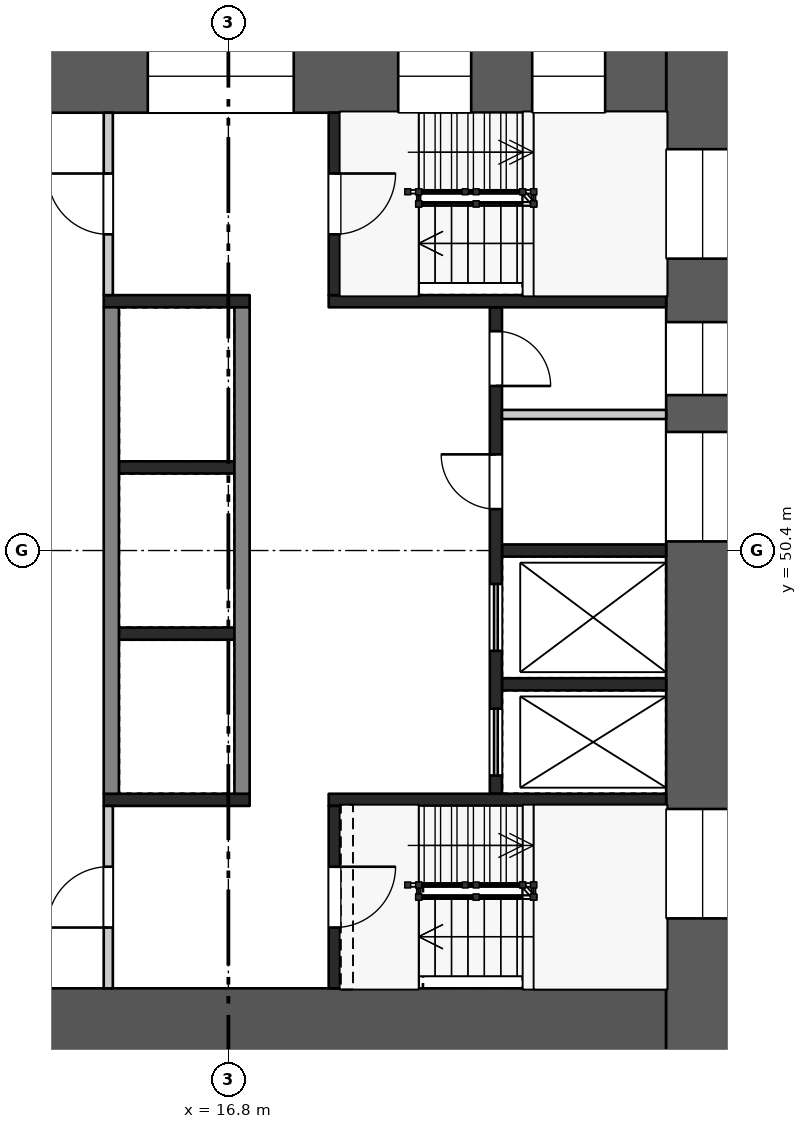
"""IFC4 building model, lengths in metres.
Left out: names, types, materials, properties, quantities, classifications, styles, units other than length and angle.
Written with IfcOpenShell. Run it as: python <this file> out.ifc"""

import sys

from ifc_helpers import new_model, si_unit, direction, frame, frame_2d, origin, place, context, subcontext, project, spatial, rectangle, extrude, element, fill, save


model = new_model("IFC4")
c1 = context("Model", 3, precision=1e-05, world=origin(), true_north=direction((0.0, 1.0)))
c2 = subcontext(c1, "Body", "Model", "MODEL_VIEW")
j1 = project(units=[si_unit("LENGTHUNIT", "METRE"), si_unit("PLANEANGLEUNIT", "RADIAN")], contexts=[c1])
p1 = place(None, origin())
s1 = spatial("IfcSite", under=j1, at=p1, CompositionType="ELEMENT")
p2 = place(p1, origin())
s2 = spatial("IfcBuilding", under=s1, at=p2, CompositionType="ELEMENT")
p3 = place(p2, frame((0.0, 0.0, 9.0)))
s3 = spatial("IfcBuildingStorey", under=s2, at=p3, CompositionType="ELEMENT", Elevation=9.0)
p4 = place(p3, frame((24.6, 58.8, 0.0), z_axis=(0.0, 0.0, 1.0), x_axis=(0.0, -1.0, 0.0)))
e1 = element("IfcWall", 1, at=p4, inside=s3, PredefinedType="SHEAR", context=c2, shape_type="SweptSolid", body=[
    extrude(rectangle(XDim=16.8, YDim=1.2, at=frame_2d((8.4, 0.0))), origin(), (0.0, 0.0, 1.0), 4.98),
])
p5 = place(p4, frame((1.8, 0.0, 0.5)))
e2 = element("IfcOpeningElement", 2, at=p5, cuts=e1, PredefinedType="OPENING", context=c2, shape_type="SweptSolid", body=[
    extrude(rectangle(XDim=1.8, YDim=2.4, at=frame_2d((0.9, 1.2))), frame((0.0, 0.61, 0.0), z_axis=(0.0, -1.0, 0.0), x_axis=(1.0, 0.0, 0.0)), (0.0, 0.0, 1.0), 1.22),
])
p6 = place(p4, frame((4.644, 0.0, 1.6)))
e3 = element("IfcOpeningElement", 3, at=p6, cuts=e1, PredefinedType="OPENING", context=c2, shape_type="SweptSolid", body=[
    extrude(rectangle(XDim=1.2, YDim=1.2, at=frame_2d((0.6, 0.6))), frame((0.0, 0.61, 0.0), z_axis=(0.0, -1.0, 0.0), x_axis=(1.0, 0.0, 0.0)), (0.0, 0.0, 1.0), 1.22),
])
p7 = place(p4, frame((6.45, 0.0, 1.6)))
e4 = element("IfcOpeningElement", 4, at=p7, cuts=e1, PredefinedType="OPENING", context=c2, shape_type="SweptSolid", body=[
    extrude(rectangle(XDim=1.8, YDim=1.2, at=frame_2d((0.9, 0.6))), frame((0.0, 0.61, 0.0), z_axis=(0.0, -1.0, 0.0), x_axis=(1.0, 0.0, 0.0)), (0.0, 0.0, 1.0), 1.22),
])
p8 = place(p4, frame((12.65, 0.0, 0.5)))
e5 = element("IfcOpeningElement", 5, at=p8, cuts=e1, PredefinedType="OPENING", context=c2, shape_type="SweptSolid", body=[
    extrude(rectangle(XDim=1.8, YDim=2.4, at=frame_2d((0.9, 1.2))), frame((0.0, 0.61, 0.0), z_axis=(0.0, -1.0, 0.0), x_axis=(1.0, 0.0, 0.0)), (0.0, 0.0, 1.0), 1.22),
])
p9 = place(p3, frame((9.6, 58.2, 0.0), z_axis=(0.0, 0.0, 1.0), x_axis=(1.0, 0.0, 0.0)))
e6 = element("IfcWall", 6, at=p9, inside=s3, PredefinedType="SHEAR", context=c2, shape_type="SweptSolid", body=[
    extrude(rectangle(XDim=14.4, YDim=1.2, at=frame_2d((7.2, 0.0))), origin(), (0.0, 0.0, 1.0), 4.98),
])
p10 = place(p9, frame((1.105, 0.0, 0.6)))
e7 = element("IfcOpeningElement", 7, at=p10, cuts=e6, PredefinedType="OPENING", context=c2, shape_type="SweptSolid", body=[
    extrude(rectangle(XDim=3.0, YDim=2.1, at=frame_2d((1.5, 1.05))), frame((0.0, 0.61, 0.0), z_axis=(0.0, -1.0, 0.0), x_axis=(1.0, 0.0, 0.0)), (0.0, 0.0, 1.0), 1.22),
])
p11 = place(p9, frame((5.875, 0.0, 0.6)))
e8 = element("IfcOpeningElement", 8, at=p11, cuts=e6, PredefinedType="OPENING", context=c2, shape_type="SweptSolid", body=[
    extrude(rectangle(XDim=2.4, YDim=2.1, at=frame_2d((1.2, 1.05))), frame((0.0, 0.61, 0.0), z_axis=(0.0, -1.0, 0.0), x_axis=(1.0, 0.0, 0.0)), (0.0, 0.0, 1.0), 1.22),
])
p12 = place(p9, frame((9.993, 0.0, 0.5)))
e9 = element("IfcOpeningElement", 9, at=p12, cuts=e6, PredefinedType="OPENING", context=c2, shape_type="SweptSolid", body=[
    extrude(rectangle(XDim=1.2, YDim=2.4, at=frame_2d((0.6, 1.2))), frame((0.0, 0.61, 0.0), z_axis=(0.0, -1.0, 0.0), x_axis=(1.0, 0.0, 0.0)), (0.0, 0.0, 1.0), 1.22),
])
p13 = place(p9, frame((12.197, 0.0, 0.5)))
e10 = element("IfcOpeningElement", 10, at=p13, cuts=e6, PredefinedType="OPENING", context=c2, shape_type="SweptSolid", body=[
    extrude(rectangle(XDim=1.2, YDim=2.4, at=frame_2d((0.6, 1.2))), frame((0.0, 0.61, 0.0), z_axis=(0.0, -1.0, 0.0), x_axis=(1.0, 0.0, 0.0)), (0.0, 0.0, 1.0), 1.22),
])
p14 = place(p3, frame((9.6, 42.6, 0.0), z_axis=(0.0, 0.0, 1.0), x_axis=(1.0, 0.0, 0.0)))
e11 = element("IfcWall", 11, at=p14, inside=s3, PredefinedType="SHEAR", context=c2, shape_type="SweptSolid", body=[
    extrude(rectangle(XDim=14.4, YDim=1.2, at=frame_2d((7.2, 0.0))), origin(), (0.0, 0.0, 1.0), 4.98),
])
p15 = place(p14, frame((2.1, 0.0, 0.0)))
e12 = element("IfcOpeningElement", 12, at=p15, cuts=e11, PredefinedType="OPENING", context=c2, shape_type="SweptSolid", body=[
    extrude(rectangle(XDim=1.8, YDim=2.1, at=frame_2d((0.9, 1.05))), frame((0.0, 0.61, 0.0), z_axis=(0.0, -1.0, 0.0), x_axis=(1.0, 0.0, 0.0)), (0.0, 0.0, 1.0), 1.22),
])
for number, where, z_axis, x_axis in (
    (13, (15.0, 51.767, 0.0), (0.0, 0.0, 1.0), (1.0, 0.0, 0.0)),
    (14, (15.0, 49.033, 0.0), (0.0, 0.0, 1.0), (1.0, 0.0, 0.0)),
):
    element("IfcWall", number, at=place(p3, frame(where, z_axis=z_axis, x_axis=x_axis)), inside=s3, PredefinedType="SHEAR", context=c2, shape_type="SweptSolid", body=[
        extrude(rectangle(XDim=1.9, YDim=0.2, at=frame_2d((0.95, 0.0))), origin(), (0.0, 0.0, 1.0), 4.98),
    ])
for number, where, z_axis, x_axis in (
    (15, (14.875, 54.4, 0.0), (0.0, 0.0, 1.0), (0.0, -1.0, 0.0)),
    (16, (17.025, 54.4, 0.0), (0.0, 0.0, 1.0), (0.0, -1.0, 0.0)),
):
    element("IfcWall", number, at=place(p3, frame(where, z_axis=z_axis, x_axis=x_axis)), inside=s3, PredefinedType="SHEAR", context=c2, shape_type="SweptSolid", body=[
        extrude(rectangle(XDim=8.0, YDim=0.25, at=frame_2d((4.0, 0.0))), origin(), (0.0, 0.0, 1.0), 4.98),
    ])
for number, where, z_axis, x_axis in (
    (17, (21.3, 50.4, 0.0), (0.0, 0.0, 1.0), (1.0, 0.0, 0.0)),
    (18, (21.3, 48.2, 0.0), (0.0, 0.0, 1.0), (1.0, 0.0, 0.0)),
):
    element("IfcWall", number, at=place(p3, frame(where, z_axis=z_axis, x_axis=x_axis)), inside=s3, PredefinedType="SHEAR", context=c2, shape_type="SweptSolid", body=[
        extrude(rectangle(XDim=2.7, YDim=0.2, at=frame_2d((1.35, 0.0))), origin(), (0.0, 0.0, 1.0), 4.98),
    ])
p16 = place(p3, frame((21.3, 52.637, 0.0), z_axis=(0.0, 0.0, 1.0), x_axis=(1.0, 0.0, 0.0)))
e19 = element("IfcWall", 19, at=p16, inside=s3, PredefinedType="PARTITIONING", context=c2, shape_type="SweptSolid", body=[
    extrude(rectangle(XDim=2.7, YDim=0.15, at=frame_2d((1.35, 0.0))), origin(), (0.0, 0.0, 1.0), 4.98),
])
p17 = place(p3, frame((21.2, 54.4, 0.0), z_axis=(0.0, 0.0, 1.0), x_axis=(0.0, -1.0, 0.0)))
e20 = element("IfcWall", 20, at=p17, inside=s3, PredefinedType="SHEAR", context=c2, shape_type="SweptSolid", body=[
    extrude(rectangle(XDim=8.0, YDim=0.2, at=frame_2d((4.0, 0.0))), origin(), (0.0, 0.0, 1.0), 4.98),
])
p18 = place(p17, frame((0.394, 0.0, 0.0)))
e21 = element("IfcOpeningElement", 21, at=p18, cuts=e20, PredefinedType="OPENING", context=c2, shape_type="SweptSolid", body=[
    extrude(rectangle(XDim=0.9, YDim=2.1, at=frame_2d((0.45, 1.05))), frame((0.0, 0.11, 0.0), z_axis=(0.0, -1.0, 0.0), x_axis=(1.0, 0.0, 0.0)), (0.0, 0.0, 1.0), 0.22),
])
p19 = place(p17, frame((2.419, 0.0, 0.0)))
e22 = element("IfcOpeningElement", 22, at=p19, cuts=e20, PredefinedType="OPENING", context=c2, shape_type="SweptSolid", body=[
    extrude(rectangle(XDim=0.9, YDim=2.1, at=frame_2d((0.45, 1.05))), frame((0.0, 0.11, 0.0), z_axis=(0.0, -1.0, 0.0), x_axis=(1.0, 0.0, 0.0)), (0.0, 0.0, 1.0), 0.22),
])
p20 = place(p17, frame((4.55, 0.0, 0.0)))
e23 = element("IfcOpeningElement", 23, at=p20, cuts=e20, PredefinedType="OPENING", context=c2, shape_type="SweptSolid", body=[
    extrude(rectangle(XDim=1.1, YDim=2.1, at=frame_2d((0.55, 1.05))), frame((0.0, 0.11, 0.0), z_axis=(0.0, -1.0, 0.0), x_axis=(1.0, 0.0, 0.0)), (0.0, 0.0, 1.0), 0.22),
])
p21 = place(p17, frame((6.6, 0.0, 0.0)))
e24 = element("IfcOpeningElement", 24, at=p21, cuts=e20, PredefinedType="OPENING", context=c2, shape_type="SweptSolid", body=[
    extrude(rectangle(XDim=1.1, YDim=2.1, at=frame_2d((0.55, 1.05))), frame((0.0, 0.11, 0.0), z_axis=(0.0, -1.0, 0.0), x_axis=(1.0, 0.0, 0.0)), (0.0, 0.0, 1.0), 0.22),
])
p22 = place(p3, frame((14.75, 54.5, 0.0), z_axis=(0.0, 0.0, 1.0), x_axis=(1.0, 0.0, 0.0)))
e25 = element("IfcWall", 25, at=p22, inside=s3, PredefinedType="SHEAR", context=c2, shape_type="SweptSolid", body=[
    extrude(rectangle(XDim=2.4, YDim=0.2, at=frame_2d((1.2, 0.0))), origin(), (0.0, 0.0, 1.0), 4.98),
])
p23 = place(p3, frame((18.45, 54.5, 0.0), z_axis=(0.0, 0.0, 1.0), x_axis=(1.0, 0.0, 0.0)))
e26 = element("IfcWall", 26, at=p23, inside=s3, PredefinedType="SHEAR", context=c2, shape_type="SweptSolid", body=[
    extrude(rectangle(XDim=5.55, YDim=0.2, at=frame_2d((2.775, 0.0))), origin(), (0.0, 0.0, 1.0), 4.98),
])
p24 = place(p3, frame((14.825, 57.6, 0.0), z_axis=(0.0, 0.0, 1.0), x_axis=(0.0, -1.0, 0.0)))
e27 = element("IfcWall", 27, at=p24, inside=s3, PredefinedType="PARTITIONING", context=c2, shape_type="SweptSolid", body=[
    extrude(rectangle(XDim=3.0, YDim=0.15, at=frame_2d((1.5, 0.0))), origin(), (0.0, 0.0, 1.0), 4.98),
])
p25 = place(p24, frame((1.0, 0.0, 0.0)))
e28 = element("IfcOpeningElement", 28, at=p25, cuts=e27, PredefinedType="OPENING", context=c2, shape_type="SweptSolid", body=[
    extrude(rectangle(XDim=1.0, YDim=2.1, at=frame_2d((0.5, 1.05))), frame((0.0, 0.085, 0.0), z_axis=(0.0, -1.0, 0.0), x_axis=(1.0, 0.0, 0.0)), (0.0, 0.0, 1.0), 0.17),
])
p26 = place(p3, frame((18.55, 57.6, 0.0), z_axis=(0.0, 0.0, 1.0), x_axis=(0.0, -1.0, 0.0)))
e29 = element("IfcWall", 29, at=p26, inside=s3, PredefinedType="SHEAR", context=c2, shape_type="SweptSolid", body=[
    extrude(rectangle(XDim=3.0, YDim=0.2, at=frame_2d((1.5, 0.0))), origin(), (0.0, 0.0, 1.0), 4.98),
])
p27 = place(p26, frame((1.0, 0.0, 0.0)))
e30 = element("IfcOpeningElement", 30, at=p27, cuts=e29, PredefinedType="OPENING", context=c2, shape_type="SweptSolid", body=[
    extrude(rectangle(XDim=1.0, YDim=2.1, at=frame_2d((0.5, 1.05))), frame((0.0, 0.11, 0.0), z_axis=(0.0, -1.0, 0.0), x_axis=(1.0, 0.0, 0.0)), (0.0, 0.0, 1.0), 0.22),
])
p28 = place(p3, frame((14.75, 46.3, 0.0), z_axis=(0.0, 0.0, 1.0), x_axis=(1.0, 0.0, 0.0)))
e31 = element("IfcWall", 31, at=p28, inside=s3, PredefinedType="SHEAR", context=c2, shape_type="SweptSolid", body=[
    extrude(rectangle(XDim=2.4, YDim=0.2, at=frame_2d((1.2, 0.0))), origin(), (0.0, 0.0, 1.0), 4.98),
])
p29 = place(p3, frame((18.45, 46.3, 0.0), z_axis=(0.0, 0.0, 1.0), x_axis=(1.0, 0.0, 0.0)))
e32 = element("IfcWall", 32, at=p29, inside=s3, PredefinedType="SHEAR", context=c2, shape_type="SweptSolid", body=[
    extrude(rectangle(XDim=5.55, YDim=0.2, at=frame_2d((2.775, 0.0))), origin(), (0.0, 0.0, 1.0), 4.98),
])
p30 = place(p3, frame((14.825, 46.2, 0.0), z_axis=(0.0, 0.0, 1.0), x_axis=(0.0, -1.0, 0.0)))
e33 = element("IfcWall", 33, at=p30, inside=s3, PredefinedType="PARTITIONING", context=c2, shape_type="SweptSolid", body=[
    extrude(rectangle(XDim=3.0, YDim=0.15, at=frame_2d((1.5, 0.0))), origin(), (0.0, 0.0, 1.0), 4.98),
])
p31 = place(p30, frame((1.0, 0.0, 0.0)))
e34 = element("IfcOpeningElement", 34, at=p31, cuts=e33, PredefinedType="OPENING", context=c2, shape_type="SweptSolid", body=[
    extrude(rectangle(XDim=1.0, YDim=2.1, at=frame_2d((0.5, 1.05))), frame((0.0, 0.085, 0.0), z_axis=(0.0, -1.0, 0.0), x_axis=(1.0, 0.0, 0.0)), (0.0, 0.0, 1.0), 0.17),
])
p32 = place(p3, frame((18.55, 46.2, 0.0), z_axis=(0.0, 0.0, 1.0), x_axis=(0.0, -1.0, 0.0)))
e35 = element("IfcWall", 35, at=p32, inside=s3, PredefinedType="SHEAR", context=c2, shape_type="SweptSolid", body=[
    extrude(rectangle(XDim=3.0, YDim=0.2, at=frame_2d((1.5, 0.0))), origin(), (0.0, 0.0, 1.0), 4.98),
])
p33 = place(p32, frame((1.0, 0.0, 0.0)))
e36 = element("IfcOpeningElement", 36, at=p33, cuts=e35, PredefinedType="OPENING", context=c2, shape_type="SweptSolid", body=[
    extrude(rectangle(XDim=1.0, YDim=2.1, at=frame_2d((0.5, 1.05))), frame((0.0, 0.11, 0.0), z_axis=(0.0, -1.0, 0.0), x_axis=(1.0, 0.0, 0.0)), (0.0, 0.0, 1.0), 0.22),
])
p34 = place(p18, origin())
e37 = element("IfcDoor", 37, at=p34, inside=s3, OperationType="SINGLE_SWING_RIGHT", PredefinedType="DOOR", context=c2, shape_type="SweptSolid", body=[
    extrude(rectangle(XDim=0.9, YDim=2.1, at=frame_2d((0.45, 1.05))), frame((0.0, 0.025, 0.0), z_axis=(0.0, -1.0, 0.0), x_axis=(1.0, 0.0, 0.0)), (0.0, 0.0, 1.0), 0.05),
])
fill(e21, e37)
p35 = place(p19, frame((0.9, 0.0, 0.0), z_axis=(0.0, 0.0, 1.0), x_axis=(-1.0, 0.0, 0.0)))
e38 = element("IfcDoor", 38, at=p35, inside=s3, OperationType="SINGLE_SWING_RIGHT", PredefinedType="DOOR", context=c2, shape_type="SweptSolid", body=[
    extrude(rectangle(XDim=0.9, YDim=2.1, at=frame_2d((0.45, 1.05))), frame((0.0, 0.025, 0.0), z_axis=(0.0, -1.0, 0.0), x_axis=(1.0, 0.0, 0.0)), (0.0, 0.0, 1.0), 0.05),
])
fill(e22, e38)
p36 = place(p20, origin())
e39 = element("IfcDoor", 39, at=p36, inside=s3, OperationType="DOUBLE_DOOR_SLIDING", PredefinedType="DOOR", context=c2, shape_type="SweptSolid", body=[
    extrude(rectangle(XDim=1.1, YDim=2.1, at=frame_2d((0.55, 1.05))), frame((0.0, 0.025, 0.0), z_axis=(0.0, -1.0, 0.0), x_axis=(1.0, 0.0, 0.0)), (0.0, 0.0, 1.0), 0.05),
])
fill(e23, e39)
p37 = place(p21, origin())
e40 = element("IfcDoor", 40, at=p37, inside=s3, OperationType="DOUBLE_DOOR_SLIDING", PredefinedType="DOOR", context=c2, shape_type="SweptSolid", body=[
    extrude(rectangle(XDim=1.1, YDim=2.1, at=frame_2d((0.55, 1.05))), frame((0.0, 0.025, 0.0), z_axis=(0.0, -1.0, 0.0), x_axis=(1.0, 0.0, 0.0)), (0.0, 0.0, 1.0), 0.05),
])
fill(e24, e40)
p38 = place(p25, frame((1.0, 0.0, 0.0), z_axis=(0.0, 0.0, 1.0), x_axis=(-1.0, 0.0, 0.0)))
e41 = element("IfcDoor", 41, at=p38, inside=s3, OperationType="SINGLE_SWING_RIGHT", PredefinedType="DOOR", context=c2, shape_type="SweptSolid", body=[
    extrude(rectangle(XDim=1.0, YDim=2.1, at=frame_2d((0.5, 1.05))), frame((0.0, 0.025, 0.0), z_axis=(0.0, -1.0, 0.0), x_axis=(1.0, 0.0, 0.0)), (0.0, 0.0, 1.0), 0.05),
])
fill(e28, e41)
p39 = place(p27, origin())
e42 = element("IfcDoor", 42, at=p39, inside=s3, OperationType="SINGLE_SWING_LEFT", PredefinedType="DOOR", context=c2, shape_type="SweptSolid", body=[
    extrude(rectangle(XDim=1.0, YDim=2.1, at=frame_2d((0.5, 1.05))), frame((0.0, 0.025, 0.0), z_axis=(0.0, -1.0, 0.0), x_axis=(1.0, 0.0, 0.0)), (0.0, 0.0, 1.0), 0.05),
])
fill(e30, e42)
p40 = place(p31, frame((1.0, 0.0, 0.0), z_axis=(0.0, 0.0, 1.0), x_axis=(-1.0, 0.0, 0.0)))
e43 = element("IfcDoor", 43, at=p40, inside=s3, OperationType="SINGLE_SWING_LEFT", PredefinedType="DOOR", context=c2, shape_type="SweptSolid", body=[
    extrude(rectangle(XDim=1.0, YDim=2.1, at=frame_2d((0.5, 1.05))), frame((0.0, 0.025, 0.0), z_axis=(0.0, -1.0, 0.0), x_axis=(1.0, 0.0, 0.0)), (0.0, 0.0, 1.0), 0.05),
])
fill(e34, e43)
p41 = place(p33, origin())
e44 = element("IfcDoor", 44, at=p41, inside=s3, OperationType="SINGLE_SWING_LEFT", PredefinedType="DOOR", context=c2, shape_type="SweptSolid", body=[
    extrude(rectangle(XDim=1.0, YDim=2.1, at=frame_2d((0.5, 1.05))), frame((0.0, 0.025, 0.0), z_axis=(0.0, -1.0, 0.0), x_axis=(1.0, 0.0, 0.0)), (0.0, 0.0, 1.0), 0.05),
])
fill(e36, e44)
p42 = place(p5, origin())
e45 = element("IfcWindow", 45, at=p42, inside=s3, PartitioningType="SINGLE_PANEL", PredefinedType="WINDOW", context=c2, shape_type="SweptSolid", body=[
    extrude(rectangle(XDim=1.8, YDim=2.4, at=frame_2d((0.9, 1.2))), frame((0.0, 0.03, 0.0), z_axis=(0.0, -1.0, 0.0), x_axis=(1.0, 0.0, 0.0)), (0.0, 0.0, 1.0), 0.06),
])
fill(e2, e45)
p43 = place(p6, origin())
e46 = element("IfcWindow", 46, at=p43, inside=s3, PartitioningType="SINGLE_PANEL", PredefinedType="WINDOW", context=c2, shape_type="SweptSolid", body=[
    extrude(rectangle(XDim=1.2, YDim=1.2, at=frame_2d((0.6, 0.6))), frame((0.0, 0.03, 0.0), z_axis=(0.0, -1.0, 0.0), x_axis=(1.0, 0.0, 0.0)), (0.0, 0.0, 1.0), 0.06),
])
fill(e3, e46)
p44 = place(p7, origin())
e47 = element("IfcWindow", 47, at=p44, inside=s3, PartitioningType="SINGLE_PANEL", PredefinedType="WINDOW", context=c2, shape_type="SweptSolid", body=[
    extrude(rectangle(XDim=1.8, YDim=1.2, at=frame_2d((0.9, 0.6))), frame((0.0, 0.03, 0.0), z_axis=(0.0, -1.0, 0.0), x_axis=(1.0, 0.0, 0.0)), (0.0, 0.0, 1.0), 0.06),
])
fill(e4, e47)
p45 = place(p8, origin())
e48 = element("IfcWindow", 48, at=p45, inside=s3, PartitioningType="SINGLE_PANEL", PredefinedType="WINDOW", context=c2, shape_type="SweptSolid", body=[
    extrude(rectangle(XDim=1.8, YDim=2.4, at=frame_2d((0.9, 1.2))), frame((0.0, 0.03, 0.0), z_axis=(0.0, -1.0, 0.0), x_axis=(1.0, 0.0, 0.0)), (0.0, 0.0, 1.0), 0.06),
])
fill(e5, e48)
p46 = place(p11, origin())
e49 = element("IfcWindow", 49, at=p46, inside=s3, PartitioningType="SINGLE_PANEL", PredefinedType="WINDOW", context=c2, shape_type="SweptSolid", body=[
    extrude(rectangle(XDim=2.4, YDim=2.1, at=frame_2d((1.2, 1.05))), frame((0.0, 0.03, 0.0), z_axis=(0.0, -1.0, 0.0), x_axis=(1.0, 0.0, 0.0)), (0.0, 0.0, 1.0), 0.06),
])
fill(e8, e49)
p47 = place(p12, origin())
e50 = element("IfcWindow", 50, at=p47, inside=s3, PartitioningType="SINGLE_PANEL", PredefinedType="WINDOW", context=c2, shape_type="SweptSolid", body=[
    extrude(rectangle(XDim=1.2, YDim=2.4, at=frame_2d((0.6, 1.2))), frame((0.0, 0.03, 0.0), z_axis=(0.0, -1.0, 0.0), x_axis=(1.0, 0.0, 0.0)), (0.0, 0.0, 1.0), 0.06),
])
fill(e9, e50)
p48 = place(p13, origin())
e51 = element("IfcWindow", 51, at=p48, inside=s3, PartitioningType="SINGLE_PANEL", PredefinedType="WINDOW", context=c2, shape_type="SweptSolid", body=[
    extrude(rectangle(XDim=1.2, YDim=2.4, at=frame_2d((0.6, 1.2))), frame((0.0, 0.03, 0.0), z_axis=(0.0, -1.0, 0.0), x_axis=(1.0, 0.0, 0.0)), (0.0, 0.0, 1.0), 0.06),
])
fill(e10, e51)
save(model, sys.argv[1])
